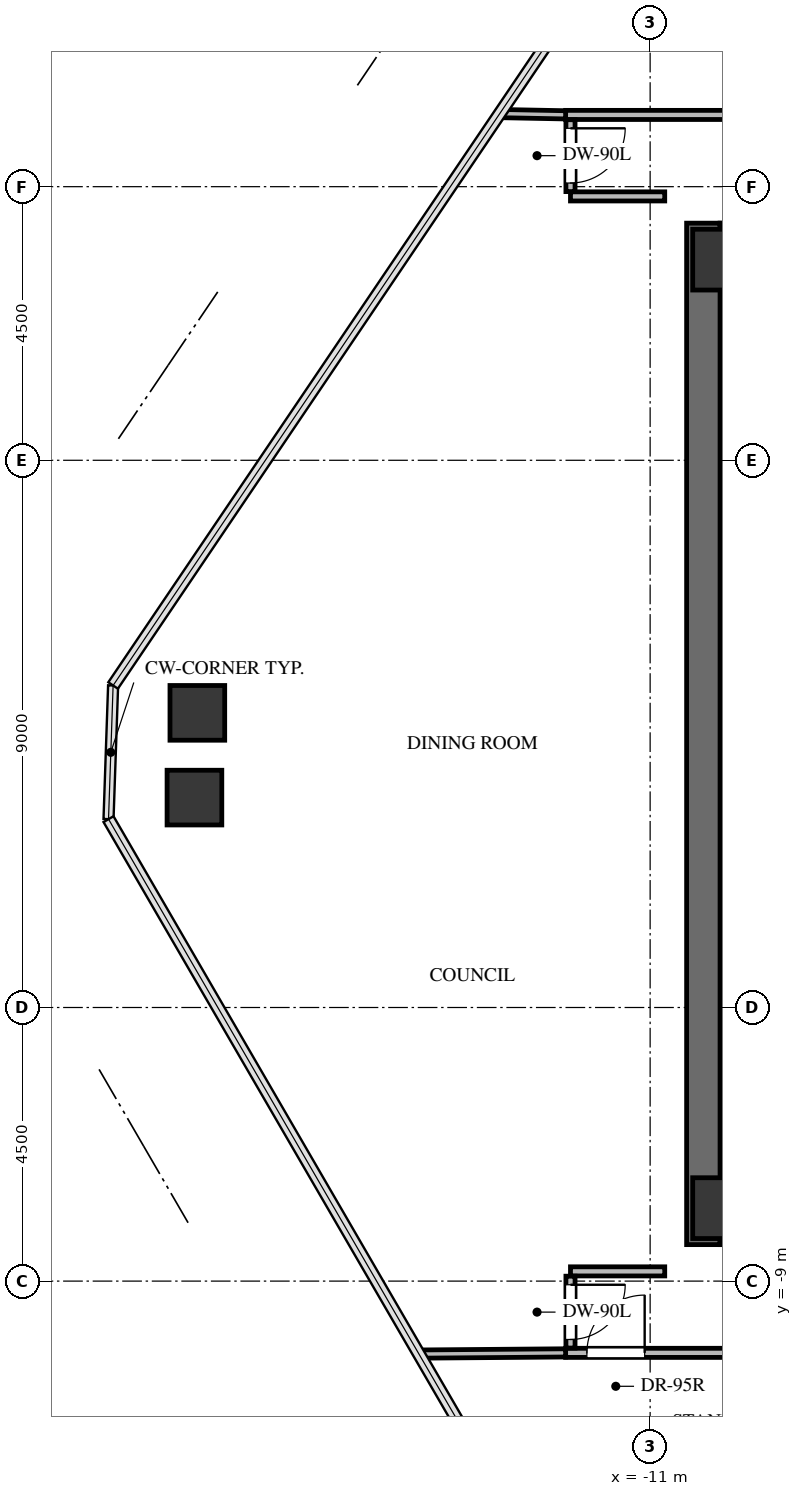
"""IFC4 building model, lengths in metres.
Left out: names, types, materials, properties, quantities, classifications, styles, units other than length and angle.
Written with IfcOpenShell. Run it as: python <this file> out.ifc"""

import sys

from ifc_helpers import new_model, si_unit, direction, frame, frame_2d, origin, origin_2d, place, context, subcontext, project, spatial, rectangle, extrude, source, transform, mapped, element, fill, save


model = new_model("IFC4")
c1 = context("Model", 3, precision=1e-05, world=origin(), true_north=direction((0.0, 1.0)))
c2 = subcontext(c1, "Body", "Model", "MODEL_VIEW")
j1 = project(units=[si_unit("LENGTHUNIT", "METRE"), si_unit("PLANEANGLEUNIT", "RADIAN")], contexts=[c1])
p1 = place(None, origin())
s1 = spatial("IfcSite", under=j1, at=p1, CompositionType="ELEMENT")
p2 = place(p1, origin())
s2 = spatial("IfcBuilding", under=s1, at=p2, CompositionType="ELEMENT")
p3 = place(p2, frame((0.0, 0.0, 241.4)))
s3 = spatial("IfcBuildingStorey", under=s2, at=p3, CompositionType="ELEMENT", Elevation=241.4)
p4 = place(p3, frame((-10.125, -8.4, 0.0), z_axis=(0.0, 0.0, 1.0), x_axis=(0.0, 1.0, 0.0)))
e1 = element("IfcWall", 1, at=p4, inside=s3, PredefinedType="SHEAR", context=c2, shape_type="SweptSolid", body=[
    extrude(rectangle(XDim=16.8, YDim=0.55, at=frame_2d((8.4, 0.0))), origin(), (0.0, 0.0, 1.0), 3.3),
])
p5 = place(p3, frame((-9.85, -8.125, 0.0), z_axis=(0.0, 0.0, 1.0), x_axis=(1.0, 0.0, 0.0)))
e2 = element("IfcWall", 2, at=p5, inside=s3, PredefinedType="SHEAR", context=c2, shape_type="SweptSolid", body=[
    extrude(rectangle(XDim=7.75, YDim=0.55, at=frame_2d((3.875, 0.0))), origin(), (0.0, 0.0, 1.0), 3.3),
])
p6 = place(p3, frame((-9.85, 8.125, 0.0), z_axis=(0.0, 0.0, 1.0), x_axis=(1.0, 0.0, 0.0)))
e3 = element("IfcWall", 3, at=p6, inside=s3, PredefinedType="SHEAR", context=c2, shape_type="SweptSolid", body=[
    extrude(rectangle(XDim=19.7, YDim=0.55, at=frame_2d((9.85, 0.0))), origin(), (0.0, 0.0, 1.0), 3.3),
])
m1 = source(origin(), c2, "Body", "SweptSolid", [
    extrude(rectangle(XDim=1.0, YDim=1.0, at=origin_2d()), origin(), (0.0, 0.0, 1.0), 3.3),
])
for number, where, z_axis, x_axis in (
    (4, (-9.8, -7.8, -0.24), (0.0, 0.0, 1.0), (1.0, 0.0, 0.0)),
    (5, (-9.8, 7.8, -0.24), (0.0, 0.0, 1.0), (1.0, 0.0, 0.0)),
):
    element("IfcColumn", number, at=place(p3, frame(where, z_axis=z_axis, x_axis=x_axis)), inside=s3, PredefinedType="COLUMN", context=c2, shape_type="MappedRepresentation", body=[
        mapped(m1, transform((0.0, 0.0, 0.0), x_axis=(1.0, 0.0, 0.0), y_axis=(0.0, 1.0, 0.0), z_axis=(0.0, 0.0, 1.0), scale=1.0)),
    ])
m2 = source(origin(), c2, "Body", "SweptSolid", [
    extrude(rectangle(XDim=0.9, YDim=0.9, at=origin_2d()), origin(), (0.0, 0.0, 1.0), 3.3),
])
for number, where, z_axis, x_axis in (
    (6, (-18.494, -1.048, -0.24), (0.0, 0.0, 1.0), (1.0, 0.0, 0.0)),
    (7, (-18.446, 0.346, -0.24), (0.0, 0.0, 1.0), (1.0, 0.0, 0.0)),
):
    element("IfcColumn", number, at=place(p3, frame(where, z_axis=z_axis, x_axis=x_axis)), inside=s3, PredefinedType="COLUMN", context=c2, shape_type="MappedRepresentation", body=[
        mapped(m2, transform((0.0, 0.0, 0.0), x_axis=(1.0, 0.0, 0.0), y_axis=(0.0, 1.0, 0.0), z_axis=(0.0, 0.0, 1.0), scale=1.0)),
    ])
p7 = place(p3, frame((-4.46, 10.18, 0.0), z_axis=(0.0, 0.0, 1.0), x_axis=(-1.0, 0.0, 0.0)))
e8 = element("IfcWall", 8, at=p7, inside=s3, PredefinedType="PARTITIONING", context=c2, shape_type="SweptSolid", body=[
    extrude(rectangle(XDim=7.93, YDim=0.15, at=frame_2d((3.965, 0.0))), origin(), (0.0, 0.0, 1.0), 2.302),
])
p8 = place(p7, frame((3.505, 0.0, 0.0)))
e9 = element("IfcOpeningElement", 9, at=p8, cuts=e8, PredefinedType="OPENING", context=c2, shape_type="SweptSolid", body=[
    extrude(rectangle(XDim=0.92, YDim=2.1, at=frame_2d((0.46, 1.05))), frame((0.0, 0.085, 0.0), z_axis=(0.0, -1.0, 0.0), x_axis=(1.0, 0.0, 0.0)), (0.0, 0.0, 1.0), 0.17),
])
p9 = place(p3, frame((-12.39, -10.18, 0.0), z_axis=(0.0, 0.0, 1.0), x_axis=(1.0, 0.0, 0.0)))
e10 = element("IfcWall", 10, at=p9, inside=s3, PredefinedType="PARTITIONING", context=c2, shape_type="SweptSolid", body=[
    extrude(rectangle(XDim=6.43, YDim=0.15, at=frame_2d((3.215, 0.0))), origin(), (0.0, 0.0, 1.0), 3.045),
])
p10 = place(p9, frame((0.35, 0.0, 0.0)))
e11 = element("IfcOpeningElement", 11, at=p10, cuts=e10, PredefinedType="OPENING", context=c2, shape_type="SweptSolid", body=[
    extrude(rectangle(XDim=0.95, YDim=2.1, at=frame_2d((0.475, 1.05))), frame((0.0, 0.085, 0.0), z_axis=(0.0, -1.0, 0.0), x_axis=(1.0, 0.0, 0.0)), (0.0, 0.0, 1.0), 0.17),
])
p11 = place(p3, frame((-10.76, -8.84, 0.0), z_axis=(0.0, 0.0, 1.0), x_axis=(-1.0, 0.0, 0.0)))
e12 = element("IfcWall", 12, at=p11, inside=s3, PredefinedType="PARTITIONING", context=c2, shape_type="SweptSolid", body=[
    extrude(rectangle(XDim=1.55, YDim=0.15, at=frame_2d((0.775, 0.0))), origin(), (0.0, 0.0, 1.0), 3.045),
])
p12 = place(p3, frame((-12.31, -8.919, 0.0), z_axis=(0.0, 0.0, 1.0), x_axis=(0.0, -1.0, 0.0)))
e13 = element("IfcWall", 13, at=p12, inside=s3, PredefinedType="PARTITIONING", context=c2, shape_type="SweptSolid", body=[
    extrude(rectangle(XDim=1.182, YDim=0.15, at=frame_2d((0.591, 0.0))), origin(), (0.0, 0.0, 1.0), 3.045),
])
p13 = place(p12, frame((0.141, 0.0, 0.0)))
e14 = element("IfcOpeningElement", 14, at=p13, cuts=e13, PredefinedType="OPENING", context=c2, shape_type="SweptSolid", body=[
    extrude(rectangle(XDim=0.9, YDim=2.05, at=frame_2d((0.45, 1.025))), frame((0.0, 0.085, 0.0), z_axis=(0.0, -1.0, 0.0), x_axis=(1.0, 0.0, 0.0)), (0.0, 0.0, 1.0), 0.17),
])
p14 = place(p3, frame((-12.31, 8.84, 0.0), z_axis=(0.0, 0.0, 1.0), x_axis=(1.0, 0.0, 0.0)))
e15 = element("IfcWall", 15, at=p14, inside=s3, PredefinedType="PARTITIONING", context=c2, shape_type="SweptSolid", body=[
    extrude(rectangle(XDim=1.55, YDim=0.15, at=frame_2d((0.775, 0.0))), origin(), (0.0, 0.0, 1.0), 3.045),
])
p15 = place(p3, frame((-12.31, 10.101, 0.0), z_axis=(0.0, 0.0, 1.0), x_axis=(0.0, -1.0, 0.0)))
e16 = element("IfcWall", 16, at=p15, inside=s3, PredefinedType="PARTITIONING", context=c2, shape_type="SweptSolid", body=[
    extrude(rectangle(XDim=1.182, YDim=0.15, at=frame_2d((0.591, 0.0))), origin(), (0.0, 0.0, 1.0), 2.399),
])
p16 = place(p15, frame((0.141, 0.0, 0.0)))
e17 = element("IfcOpeningElement", 17, at=p16, cuts=e16, PredefinedType="OPENING", context=c2, shape_type="SweptSolid", body=[
    extrude(rectangle(XDim=0.9, YDim=2.05, at=frame_2d((0.45, 1.025))), frame((0.0, 0.085, 0.0), z_axis=(0.0, -1.0, 0.0), x_axis=(1.0, 0.0, 0.0)), (0.0, 0.0, 1.0), 0.17),
])
p17 = place(p3, frame((-12.39, 10.181, 0.0), z_axis=(0.0, 0.0, 1.0), x_axis=(-0.999812128272, 0.019383192748, 0.0)))
e18 = element("IfcWall", 18, at=p17, inside=s3, PredefinedType="PARTITIONING", context=c2, shape_type="SweptSolid", body=[
    extrude(rectangle(XDim=1.083, YDim=0.135, at=frame_2d((0.542, 0.0))), origin(), (0.0, 0.0, 1.0), 3.045),
])
p18 = place(p3, frame((-14.802, -10.2, 0.0), z_axis=(0.0, 0.0, 1.0), x_axis=(0.999968020968, 0.007997314604, 0.0)))
e19 = element("IfcWall", 19, at=p18, inside=s3, PredefinedType="PARTITIONING", context=c2, shape_type="SweptSolid", body=[
    extrude(rectangle(XDim=2.412, YDim=0.135, at=frame_2d((1.206, 0.0))), origin(), (0.0, 0.0, 1.0), 2.399),
])
m3 = source(origin(), c2, "Body", "SweptSolid", [
    extrude(rectangle(XDim=0.95, YDim=2.1, at=frame_2d((0.475, 1.05))), frame((0.0, 0.025, 0.0), z_axis=(0.0, -1.0, 0.0), x_axis=(1.0, 0.0, 0.0)), (0.0, 0.0, 1.0), 0.05),
])
p19 = place(p10, origin())
e20 = element("IfcDoor", 20, at=p19, inside=s3, OperationType="SINGLE_SWING_RIGHT", PredefinedType="DOOR", context=c2, shape_type="MappedRepresentation", body=[
    mapped(m3, transform((0.0, 0.0, 0.0), x_axis=(1.0, 0.0, 0.0), y_axis=(0.0, 1.0, 0.0), z_axis=(0.0, 0.0, 1.0), scale=1.0)),
])
fill(e11, e20)
m4 = source(origin(), c2, "Body", "SweptSolid", [
    extrude(rectangle(XDim=0.9, YDim=2.05, at=frame_2d((0.45, 1.025))), frame((0.0, 0.025, 0.0), z_axis=(0.0, -1.0, 0.0), x_axis=(1.0, 0.0, 0.0)), (0.0, 0.0, 1.0), 0.05),
])
p20 = place(p13, origin())
e21 = element("IfcDoor", 21, at=p20, inside=s3, OperationType="SINGLE_SWING_LEFT", PredefinedType="DOOR", context=c2, shape_type="MappedRepresentation", body=[
    mapped(m4, transform((0.0, 0.0, 0.0), x_axis=(1.0, 0.0, 0.0), y_axis=(0.0, 1.0, 0.0), z_axis=(0.0, 0.0, 1.0), scale=1.0)),
])
fill(e14, e21)
p21 = place(p16, origin())
e22 = element("IfcDoor", 22, at=p21, inside=s3, OperationType="SINGLE_SWING_LEFT", PredefinedType="DOOR", context=c2, shape_type="MappedRepresentation", body=[
    mapped(m4, transform((0.0, 0.0, 0.0), x_axis=(1.0, 0.0, 0.0), y_axis=(0.0, 1.0, 0.0), z_axis=(0.0, 0.0, 1.0), scale=1.0)),
])
fill(e17, e22)
save(model, sys.argv[1])
